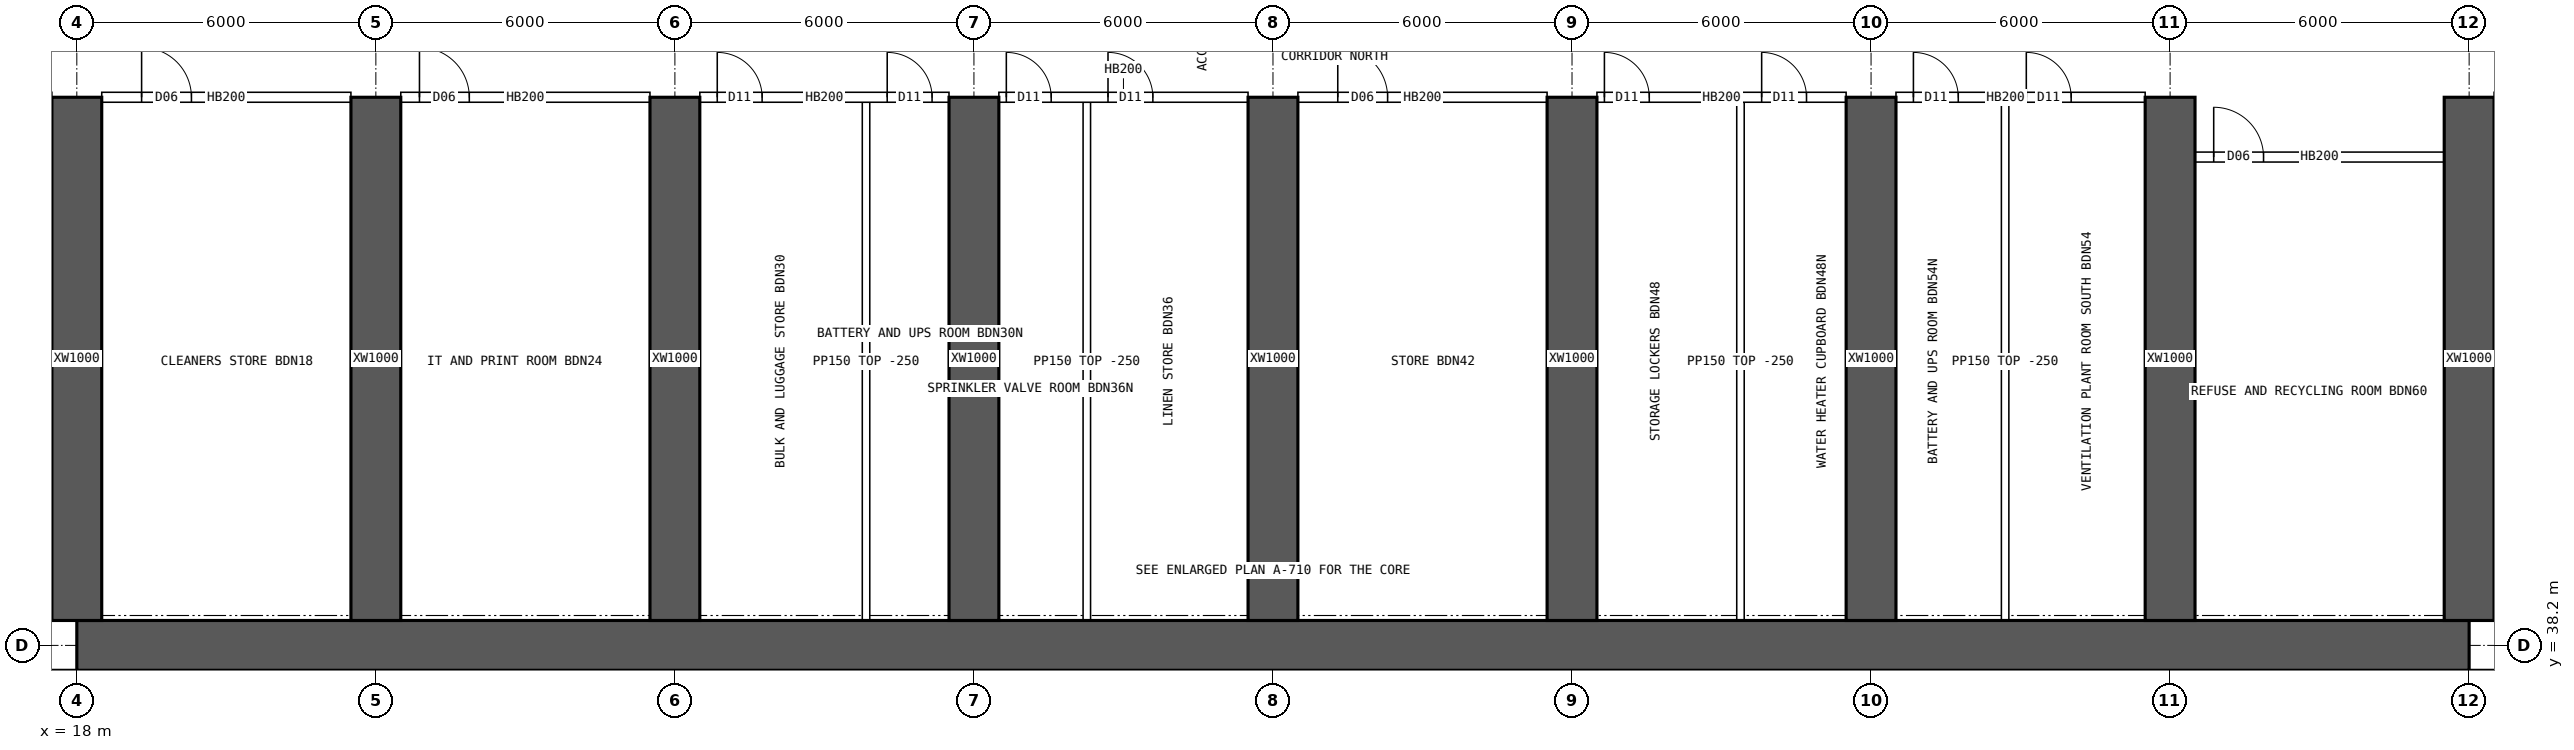
"""IFC4 building model, lengths in metres.
Left out: names, types, materials, properties, quantities, classifications, styles, units other than length and angle.
Written with IfcOpenShell. Run it as: python <this file> out.ifc"""

import sys

from ifc_helpers import new_model, si_unit, direction, frame, frame_2d, origin, place, context, subcontext, project, spatial, rectangle, extrude, element, fill, save


model = new_model("IFC4")
c1 = context("Model", 3, precision=1e-05, world=origin(), true_north=direction((0.0, 1.0)))
c2 = subcontext(c1, "Body", "Model", "MODEL_VIEW")
j1 = project(units=[si_unit("LENGTHUNIT", "METRE"), si_unit("PLANEANGLEUNIT", "RADIAN")], contexts=[c1])
p1 = place(None, origin())
s1 = spatial("IfcSite", under=j1, at=p1, CompositionType="ELEMENT")
p2 = place(p1, origin())
s2 = spatial("IfcBuilding", under=s1, at=p2, CompositionType="ELEMENT")
p3 = place(p2, frame((0.0, 0.0, 31.45)))
s3 = spatial("IfcBuildingStorey", under=s2, at=p3, CompositionType="ELEMENT", Elevation=31.45)
p4 = place(p3, frame((18.0, 38.2, 0.0), z_axis=(0.0, 0.0, 1.0), x_axis=(1.0, 0.0, 0.0)))
e1 = element("IfcWall", 1, at=p4, inside=s3, PredefinedType="SHEAR", context=c2, shape_type="SweptSolid", body=[
    extrude(rectangle(XDim=48.0, YDim=1.0, at=frame_2d((24.0, 0.0))), origin(), (0.0, 0.0, 1.0), 3.75),
])
for number, where, z_axis, x_axis in (
    (2, (21.6, 34.75, 0.0), (0.0, 0.0, 1.0), (0.0, 1.0, 0.0)),
    (3, (62.4, 34.75, 0.0), (0.0, 0.0, 1.0), (0.0, 1.0, 0.0)),
    (4, (26.0, 34.75, 0.0), (0.0, 0.0, 1.0), (0.0, 1.0, 0.0)),
    (5, (58.0, 34.75, 0.0), (0.0, 0.0, 1.0), (0.0, 1.0, 0.0)),
):
    element("IfcWall", number, at=place(p3, frame(where, z_axis=z_axis, x_axis=x_axis)), inside=s3, PredefinedType="SHEAR", context=c2, shape_type="SweptSolid", body=[
        extrude(rectangle(XDim=2.95, YDim=0.3, at=frame_2d((1.475, 0.0))), origin(), (0.0, 0.0, 1.0), 3.75),
    ])
for number, where, z_axis, x_axis in (
    (6, (18.0, 38.7, 0.0), (0.0, 0.0, 1.0), (0.0, 1.0, 0.0)),
    (7, (24.0, 38.7, 0.0), (0.0, 0.0, 1.0), (0.0, 1.0, 0.0)),
    (8, (30.0, 38.7, 0.0), (0.0, 0.0, 1.0), (0.0, 1.0, 0.0)),
    (9, (36.0, 38.7, 0.0), (0.0, 0.0, 1.0), (0.0, 1.0, 0.0)),
    (10, (42.0, 38.7, 0.0), (0.0, 0.0, 1.0), (0.0, 1.0, 0.0)),
    (11, (48.0, 38.7, 0.0), (0.0, 0.0, 1.0), (0.0, 1.0, 0.0)),
    (12, (54.0, 38.7, 0.0), (0.0, 0.0, 1.0), (0.0, 1.0, 0.0)),
    (13, (60.0, 38.7, 0.0), (0.0, 0.0, 1.0), (0.0, 1.0, 0.0)),
    (14, (66.0, 38.7, 0.0), (0.0, 0.0, 1.0), (0.0, 1.0, 0.0)),
):
    element("IfcWall", number, at=place(p3, frame(where, z_axis=z_axis, x_axis=x_axis)), inside=s3, PredefinedType="SHEAR", context=c2, shape_type="SweptSolid", body=[
        extrude(rectangle(XDim=10.5, YDim=1.0, at=frame_2d((5.25, 0.0))), origin(), (0.0, 0.0, 1.0), 3.75),
    ])
for number, where, z_axis, x_axis in (
    (15, (29.651, 34.75, 0.0), (0.0, 0.0, 1.0), (0.0, 1.0, 0.0)),
    (16, (33.946, 34.75, 0.0), (0.0, 0.0, 1.0), (0.0, 1.0, 0.0)),
    (17, (36.946, 34.75, 0.0), (0.0, 0.0, 1.0), (0.0, 1.0, 0.0)),
    (18, (41.463, 34.75, 0.0), (0.0, 0.0, 1.0), (0.0, 1.0, 0.0)),
    (19, (45.758, 34.75, 0.0), (0.0, 0.0, 1.0), (0.0, 1.0, 0.0)),
    (20, (47.058, 34.75, 0.0), (0.0, 0.0, 1.0), (0.0, 1.0, 0.0)),
    (21, (49.692, 34.75, 0.0), (0.0, 0.0, 1.0), (0.0, 1.0, 0.0)),
    (22, (51.921, 34.75, 0.0), (0.0, 0.0, 1.0), (0.0, 1.0, 0.0)),
    (23, (55.163, 34.75, 0.0), (0.0, 0.0, 1.0), (0.0, 1.0, 0.0)),
):
    element("IfcWall", number, at=place(p3, frame(where, z_axis=z_axis, x_axis=x_axis)), inside=s3, PredefinedType="SOLIDWALL", context=c2, shape_type="SweptSolid", body=[
        extrude(rectangle(XDim=2.95, YDim=0.15, at=frame_2d((1.475, 0.0))), origin(), (0.0, 0.0, 1.0), 3.5),
    ])
p5 = place(p3, frame((18.5, 49.2, 0.0), z_axis=(0.0, 0.0, 1.0), x_axis=(1.0, 0.0, 0.0)))
e24 = element("IfcWall", 24, at=p5, inside=s3, PredefinedType="SOLIDWALL", context=c2, shape_type="SweptSolid", body=[
    extrude(rectangle(XDim=5.0, YDim=0.2, at=frame_2d((2.5, 0.0))), origin(), (0.0, 0.0, 1.0), 3.5),
])
p6 = place(p5, frame((0.8, 0.0, 0.0)))
e25 = element("IfcOpeningElement", 25, at=p6, cuts=e24, PredefinedType="OPENING", context=c2, shape_type="SweptSolid", body=[
    extrude(rectangle(XDim=1.0, YDim=2.1, at=frame_2d((0.5, 1.05))), frame((0.0, 0.11, 0.0), z_axis=(0.0, -1.0, 0.0), x_axis=(1.0, 0.0, 0.0)), (0.0, 0.0, 1.0), 0.22),
])
p7 = place(p3, frame((24.5, 49.2, 0.0), z_axis=(0.0, 0.0, 1.0), x_axis=(1.0, 0.0, 0.0)))
e26 = element("IfcWall", 26, at=p7, inside=s3, PredefinedType="SOLIDWALL", context=c2, shape_type="SweptSolid", body=[
    extrude(rectangle(XDim=5.0, YDim=0.2, at=frame_2d((2.5, 0.0))), origin(), (0.0, 0.0, 1.0), 3.5),
])
p8 = place(p7, frame((0.375, 0.0, 0.0)))
e27 = element("IfcOpeningElement", 27, at=p8, cuts=e26, PredefinedType="OPENING", context=c2, shape_type="SweptSolid", body=[
    extrude(rectangle(XDim=1.0, YDim=2.1, at=frame_2d((0.5, 1.05))), frame((0.0, 0.11, 0.0), z_axis=(0.0, -1.0, 0.0), x_axis=(1.0, 0.0, 0.0)), (0.0, 0.0, 1.0), 0.22),
])
p9 = place(p3, frame((30.5, 49.2, 0.0), z_axis=(0.0, 0.0, 1.0), x_axis=(1.0, 0.0, 0.0)))
e28 = element("IfcWall", 28, at=p9, inside=s3, PredefinedType="SOLIDWALL", context=c2, shape_type="SweptSolid", body=[
    extrude(rectangle(XDim=5.0, YDim=0.2, at=frame_2d((2.5, 0.0))), origin(), (0.0, 0.0, 1.0), 3.5),
])
p10 = place(p9, frame((0.35, 0.0, 0.0)))
e29 = element("IfcOpeningElement", 29, at=p10, cuts=e28, PredefinedType="OPENING", context=c2, shape_type="SweptSolid", body=[
    extrude(rectangle(XDim=0.9, YDim=2.1, at=frame_2d((0.45, 1.05))), frame((0.0, 0.11, 0.0), z_axis=(0.0, -1.0, 0.0), x_axis=(1.0, 0.0, 0.0)), (0.0, 0.0, 1.0), 0.22),
])
p11 = place(p9, frame((3.76, 0.0, 0.0)))
e30 = element("IfcOpeningElement", 30, at=p11, cuts=e28, PredefinedType="OPENING", context=c2, shape_type="SweptSolid", body=[
    extrude(rectangle(XDim=0.9, YDim=2.1, at=frame_2d((0.45, 1.05))), frame((0.0, 0.11, 0.0), z_axis=(0.0, -1.0, 0.0), x_axis=(1.0, 0.0, 0.0)), (0.0, 0.0, 1.0), 0.22),
])
p12 = place(p3, frame((36.5, 49.2, 0.0), z_axis=(0.0, 0.0, 1.0), x_axis=(1.0, 0.0, 0.0)))
e31 = element("IfcWall", 31, at=p12, inside=s3, PredefinedType="SOLIDWALL", context=c2, shape_type="SweptSolid", body=[
    extrude(rectangle(XDim=5.0, YDim=0.2, at=frame_2d((2.5, 0.0))), origin(), (0.0, 0.0, 1.0), 3.5),
])
p13 = place(p12, frame((0.15, 0.0, 0.0)))
e32 = element("IfcOpeningElement", 32, at=p13, cuts=e31, PredefinedType="OPENING", context=c2, shape_type="SweptSolid", body=[
    extrude(rectangle(XDim=0.9, YDim=2.1, at=frame_2d((0.45, 1.05))), frame((0.0, 0.11, 0.0), z_axis=(0.0, -1.0, 0.0), x_axis=(1.0, 0.0, 0.0)), (0.0, 0.0, 1.0), 0.22),
])
p14 = place(p12, frame((2.19, 0.0, 0.0)))
e33 = element("IfcOpeningElement", 33, at=p14, cuts=e31, PredefinedType="OPENING", context=c2, shape_type="SweptSolid", body=[
    extrude(rectangle(XDim=0.9, YDim=2.1, at=frame_2d((0.45, 1.05))), frame((0.0, 0.11, 0.0), z_axis=(0.0, -1.0, 0.0), x_axis=(1.0, 0.0, 0.0)), (0.0, 0.0, 1.0), 0.22),
])
p15 = place(p3, frame((42.5, 49.2, 0.0), z_axis=(0.0, 0.0, 1.0), x_axis=(1.0, 0.0, 0.0)))
e34 = element("IfcWall", 34, at=p15, inside=s3, PredefinedType="SOLIDWALL", context=c2, shape_type="SweptSolid", body=[
    extrude(rectangle(XDim=5.0, YDim=0.2, at=frame_2d((2.5, 0.0))), origin(), (0.0, 0.0, 1.0), 3.5),
])
p16 = place(p15, frame((0.8, 0.0, 0.0)))
e35 = element("IfcOpeningElement", 35, at=p16, cuts=e34, PredefinedType="OPENING", context=c2, shape_type="SweptSolid", body=[
    extrude(rectangle(XDim=1.0, YDim=2.1, at=frame_2d((0.5, 1.05))), frame((0.0, 0.11, 0.0), z_axis=(0.0, -1.0, 0.0), x_axis=(1.0, 0.0, 0.0)), (0.0, 0.0, 1.0), 0.22),
])
p17 = place(p3, frame((48.5, 49.2, 0.0), z_axis=(0.0, 0.0, 1.0), x_axis=(1.0, 0.0, 0.0)))
e36 = element("IfcWall", 36, at=p17, inside=s3, PredefinedType="SOLIDWALL", context=c2, shape_type="SweptSolid", body=[
    extrude(rectangle(XDim=5.0, YDim=0.2, at=frame_2d((2.5, 0.0))), origin(), (0.0, 0.0, 1.0), 3.5),
])
p18 = place(p17, frame((0.15, 0.0, 0.0)))
e37 = element("IfcOpeningElement", 37, at=p18, cuts=e36, PredefinedType="OPENING", context=c2, shape_type="SweptSolid", body=[
    extrude(rectangle(XDim=0.9, YDim=2.1, at=frame_2d((0.45, 1.05))), frame((0.0, 0.11, 0.0), z_axis=(0.0, -1.0, 0.0), x_axis=(1.0, 0.0, 0.0)), (0.0, 0.0, 1.0), 0.22),
])
p19 = place(p17, frame((3.305, 0.0, 0.0)))
e38 = element("IfcOpeningElement", 38, at=p19, cuts=e36, PredefinedType="OPENING", context=c2, shape_type="SweptSolid", body=[
    extrude(rectangle(XDim=0.9, YDim=2.1, at=frame_2d((0.45, 1.05))), frame((0.0, 0.11, 0.0), z_axis=(0.0, -1.0, 0.0), x_axis=(1.0, 0.0, 0.0)), (0.0, 0.0, 1.0), 0.22),
])
p20 = place(p3, frame((54.5, 49.2, 0.0), z_axis=(0.0, 0.0, 1.0), x_axis=(1.0, 0.0, 0.0)))
e39 = element("IfcWall", 39, at=p20, inside=s3, PredefinedType="SOLIDWALL", context=c2, shape_type="SweptSolid", body=[
    extrude(rectangle(XDim=5.0, YDim=0.2, at=frame_2d((2.5, 0.0))), origin(), (0.0, 0.0, 1.0), 3.5),
])
p21 = place(p20, frame((0.35, 0.0, 0.0)))
e40 = element("IfcOpeningElement", 40, at=p21, cuts=e39, PredefinedType="OPENING", context=c2, shape_type="SweptSolid", body=[
    extrude(rectangle(XDim=0.9, YDim=2.1, at=frame_2d((0.45, 1.05))), frame((0.0, 0.11, 0.0), z_axis=(0.0, -1.0, 0.0), x_axis=(1.0, 0.0, 0.0)), (0.0, 0.0, 1.0), 0.22),
])
p22 = place(p20, frame((2.615, 0.0, 0.0)))
e41 = element("IfcOpeningElement", 41, at=p22, cuts=e39, PredefinedType="OPENING", context=c2, shape_type="SweptSolid", body=[
    extrude(rectangle(XDim=0.9, YDim=2.1, at=frame_2d((0.45, 1.05))), frame((0.0, 0.11, 0.0), z_axis=(0.0, -1.0, 0.0), x_axis=(1.0, 0.0, 0.0)), (0.0, 0.0, 1.0), 0.22),
])
for number, where, z_axis, x_axis in (
    (42, (33.835, 38.7, 0.0), (0.0, 0.0, 1.0), (0.0, 1.0, 0.0)),
    (43, (38.265, 38.7, 0.0), (0.0, 0.0, 1.0), (0.0, 1.0, 0.0)),
    (44, (51.38, 38.7, 0.0), (0.0, 0.0, 1.0), (0.0, 1.0, 0.0)),
    (45, (56.69, 38.7, 0.0), (0.0, 0.0, 1.0), (0.0, 1.0, 0.0)),
):
    element("IfcWall", number, at=place(p3, frame(where, z_axis=z_axis, x_axis=x_axis)), inside=s3, PredefinedType="PARTITIONING", context=c2, shape_type="SweptSolid", body=[
        extrude(rectangle(XDim=10.4, YDim=0.15, at=frame_2d((5.2, 0.0))), origin(), (0.0, 0.0, 1.0), 3.5),
    ])
p23 = place(p3, frame((60.5, 48.0, 0.0), z_axis=(0.0, 0.0, 1.0), x_axis=(1.0, 0.0, 0.0)))
e46 = element("IfcWall", 46, at=p23, inside=s3, PredefinedType="SOLIDWALL", context=c2, shape_type="SweptSolid", body=[
    extrude(rectangle(XDim=5.0, YDim=0.2, at=frame_2d((2.5, 0.0))), origin(), (0.0, 0.0, 1.0), 3.5),
])
p24 = place(p23, frame((0.375, 0.0, 0.0)))
e47 = element("IfcOpeningElement", 47, at=p24, cuts=e46, PredefinedType="OPENING", context=c2, shape_type="SweptSolid", body=[
    extrude(rectangle(XDim=1.0, YDim=2.1, at=frame_2d((0.5, 1.05))), frame((0.0, 0.11, 0.0), z_axis=(0.0, -1.0, 0.0), x_axis=(1.0, 0.0, 0.0)), (0.0, 0.0, 1.0), 0.22),
])
p25 = place(p6, origin())
e48 = element("IfcDoor", 48, at=p25, inside=s3, OperationType="SINGLE_SWING_LEFT", PredefinedType="DOOR", context=c2, shape_type="SweptSolid", body=[
    extrude(rectangle(XDim=1.0, YDim=2.1, at=frame_2d((0.5, 1.05))), frame((0.0, 0.025, 0.0), z_axis=(0.0, -1.0, 0.0), x_axis=(1.0, 0.0, 0.0)), (0.0, 0.0, 1.0), 0.05),
])
fill(e25, e48)
p26 = place(p8, origin())
e49 = element("IfcDoor", 49, at=p26, inside=s3, OperationType="SINGLE_SWING_LEFT", PredefinedType="DOOR", context=c2, shape_type="SweptSolid", body=[
    extrude(rectangle(XDim=1.0, YDim=2.1, at=frame_2d((0.5, 1.05))), frame((0.0, 0.025, 0.0), z_axis=(0.0, -1.0, 0.0), x_axis=(1.0, 0.0, 0.0)), (0.0, 0.0, 1.0), 0.05),
])
fill(e27, e49)
p27 = place(p10, origin())
e50 = element("IfcDoor", 50, at=p27, inside=s3, OperationType="SINGLE_SWING_LEFT", PredefinedType="DOOR", context=c2, shape_type="SweptSolid", body=[
    extrude(rectangle(XDim=0.9, YDim=2.1, at=frame_2d((0.45, 1.05))), frame((0.0, 0.025, 0.0), z_axis=(0.0, -1.0, 0.0), x_axis=(1.0, 0.0, 0.0)), (0.0, 0.0, 1.0), 0.05),
])
fill(e29, e50)
p28 = place(p11, origin())
e51 = element("IfcDoor", 51, at=p28, inside=s3, OperationType="SINGLE_SWING_LEFT", PredefinedType="DOOR", context=c2, shape_type="SweptSolid", body=[
    extrude(rectangle(XDim=0.9, YDim=2.1, at=frame_2d((0.45, 1.05))), frame((0.0, 0.025, 0.0), z_axis=(0.0, -1.0, 0.0), x_axis=(1.0, 0.0, 0.0)), (0.0, 0.0, 1.0), 0.05),
])
fill(e30, e51)
p29 = place(p13, origin())
e52 = element("IfcDoor", 52, at=p29, inside=s3, OperationType="SINGLE_SWING_LEFT", PredefinedType="DOOR", context=c2, shape_type="SweptSolid", body=[
    extrude(rectangle(XDim=0.9, YDim=2.1, at=frame_2d((0.45, 1.05))), frame((0.0, 0.025, 0.0), z_axis=(0.0, -1.0, 0.0), x_axis=(1.0, 0.0, 0.0)), (0.0, 0.0, 1.0), 0.05),
])
fill(e32, e52)
p30 = place(p14, origin())
e53 = element("IfcDoor", 53, at=p30, inside=s3, OperationType="SINGLE_SWING_LEFT", PredefinedType="DOOR", context=c2, shape_type="SweptSolid", body=[
    extrude(rectangle(XDim=0.9, YDim=2.1, at=frame_2d((0.45, 1.05))), frame((0.0, 0.025, 0.0), z_axis=(0.0, -1.0, 0.0), x_axis=(1.0, 0.0, 0.0)), (0.0, 0.0, 1.0), 0.05),
])
fill(e33, e53)
p31 = place(p16, origin())
e54 = element("IfcDoor", 54, at=p31, inside=s3, OperationType="SINGLE_SWING_LEFT", PredefinedType="DOOR", context=c2, shape_type="SweptSolid", body=[
    extrude(rectangle(XDim=1.0, YDim=2.1, at=frame_2d((0.5, 1.05))), frame((0.0, 0.025, 0.0), z_axis=(0.0, -1.0, 0.0), x_axis=(1.0, 0.0, 0.0)), (0.0, 0.0, 1.0), 0.05),
])
fill(e35, e54)
p32 = place(p18, origin())
e55 = element("IfcDoor", 55, at=p32, inside=s3, OperationType="SINGLE_SWING_LEFT", PredefinedType="DOOR", context=c2, shape_type="SweptSolid", body=[
    extrude(rectangle(XDim=0.9, YDim=2.1, at=frame_2d((0.45, 1.05))), frame((0.0, 0.025, 0.0), z_axis=(0.0, -1.0, 0.0), x_axis=(1.0, 0.0, 0.0)), (0.0, 0.0, 1.0), 0.05),
])
fill(e37, e55)
p33 = place(p19, origin())
e56 = element("IfcDoor", 56, at=p33, inside=s3, OperationType="SINGLE_SWING_LEFT", PredefinedType="DOOR", context=c2, shape_type="SweptSolid", body=[
    extrude(rectangle(XDim=0.9, YDim=2.1, at=frame_2d((0.45, 1.05))), frame((0.0, 0.025, 0.0), z_axis=(0.0, -1.0, 0.0), x_axis=(1.0, 0.0, 0.0)), (0.0, 0.0, 1.0), 0.05),
])
fill(e38, e56)
p34 = place(p21, origin())
e57 = element("IfcDoor", 57, at=p34, inside=s3, OperationType="SINGLE_SWING_LEFT", PredefinedType="DOOR", context=c2, shape_type="SweptSolid", body=[
    extrude(rectangle(XDim=0.9, YDim=2.1, at=frame_2d((0.45, 1.05))), frame((0.0, 0.025, 0.0), z_axis=(0.0, -1.0, 0.0), x_axis=(1.0, 0.0, 0.0)), (0.0, 0.0, 1.0), 0.05),
])
fill(e40, e57)
p35 = place(p22, origin())
e58 = element("IfcDoor", 58, at=p35, inside=s3, OperationType="SINGLE_SWING_LEFT", PredefinedType="DOOR", context=c2, shape_type="SweptSolid", body=[
    extrude(rectangle(XDim=0.9, YDim=2.1, at=frame_2d((0.45, 1.05))), frame((0.0, 0.025, 0.0), z_axis=(0.0, -1.0, 0.0), x_axis=(1.0, 0.0, 0.0)), (0.0, 0.0, 1.0), 0.05),
])
fill(e41, e58)
p36 = place(p24, origin())
e59 = element("IfcDoor", 59, at=p36, inside=s3, OperationType="SINGLE_SWING_LEFT", PredefinedType="DOOR", context=c2, shape_type="SweptSolid", body=[
    extrude(rectangle(XDim=1.0, YDim=2.1, at=frame_2d((0.5, 1.05))), frame((0.0, 0.025, 0.0), z_axis=(0.0, -1.0, 0.0), x_axis=(1.0, 0.0, 0.0)), (0.0, 0.0, 1.0), 0.05),
])
fill(e47, e59)
save(model, sys.argv[1])
